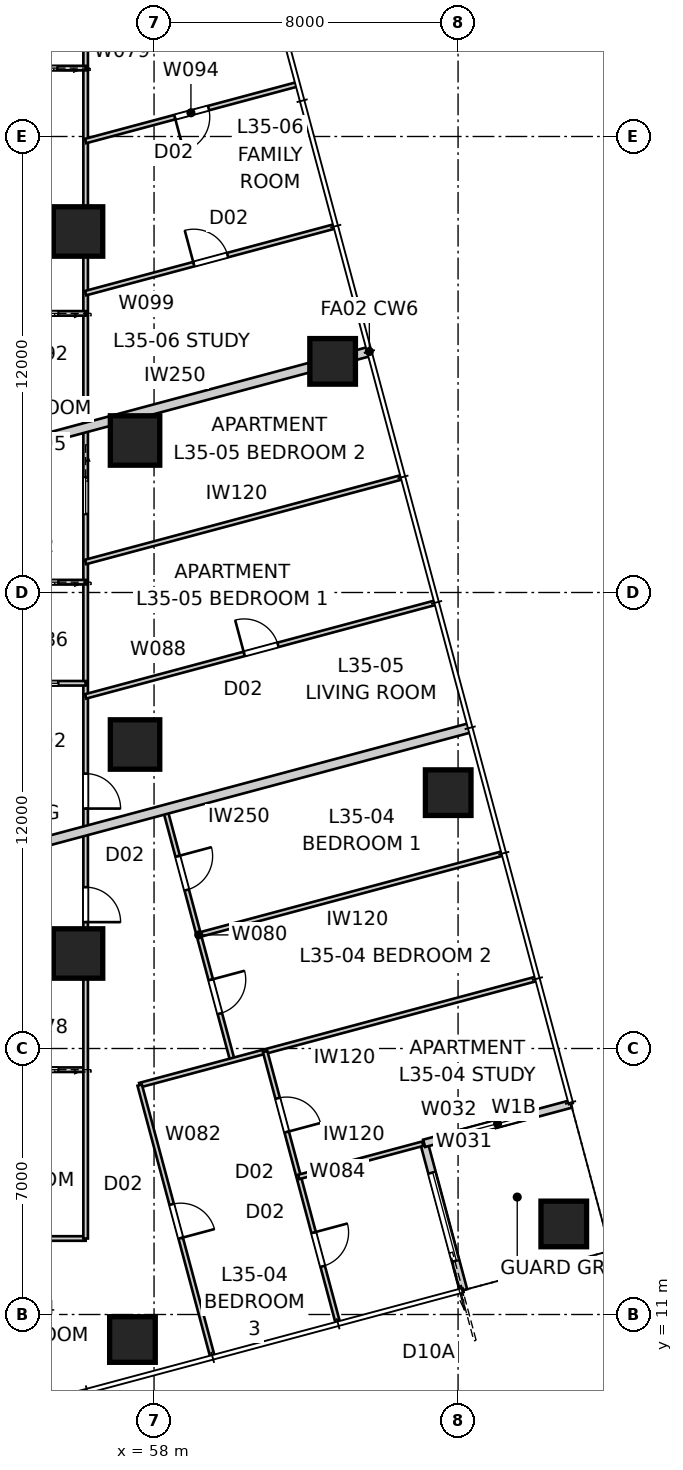
"""IFC4 building model, lengths in metres.
Left out: names, types, materials, properties, quantities, classifications, styles, units other than length and angle.
Written with IfcOpenShell. Run it as: python <this file> out.ifc"""

import sys

from ifc_helpers import new_model, si_unit, direction, frame, frame_2d, origin, origin_2d, place, context, subcontext, project, spatial, rectangle, extrude, element, fill, save


model = new_model("IFC4")
c1 = context("Model", 3, precision=1e-05, world=origin(), true_north=direction((0.0, 1.0)))
c2 = subcontext(c1, "Body", "Model", "MODEL_VIEW")
j1 = project(units=[si_unit("LENGTHUNIT", "METRE"), si_unit("PLANEANGLEUNIT", "RADIAN")], contexts=[c1])
p1 = place(None, origin())
s1 = spatial("IfcSite", under=j1, at=p1, CompositionType="ELEMENT")
p2 = place(p1, origin())
s2 = spatial("IfcBuilding", under=s1, at=p2, CompositionType="ELEMENT")
p3 = place(p2, frame((0.0, 0.0, 128.6)))
s3 = spatial("IfcBuildingStorey", under=s2, at=p3, CompositionType="ELEMENT", Elevation=128.6)
for number, where, z_axis, x_axis in (
    (1, (57.432, 10.342, 0.0), (0.0, 0.0, 1.0), (1.0, 0.0, 0.0)),
    (2, (68.781, 13.383, 0.0), (0.0, 0.0, 1.0), (1.0, 0.0, 0.0)),
    (3, (65.74, 24.733, 0.0), (0.0, 0.0, 1.0), (1.0, 0.0, 0.0)),
    (4, (62.699, 36.082, 0.0), (0.0, 0.0, 1.0), (1.0, 0.0, 0.0)),
):
    element("IfcColumn", number, at=place(p3, frame(where, z_axis=z_axis, x_axis=x_axis)), inside=s3, PredefinedType="COLUMN", context=c2, shape_type="SweptSolid", body=[
        extrude(rectangle(XDim=1.2, YDim=1.2, at=origin_2d()), origin(), (0.0, 0.0, 1.0), 3.4),
    ])
for number, where, z_axis, x_axis in (
    (5, (57.5, 26.0, 0.0), (0.0, 0.0, 1.0), (1.0, 0.0, 0.0)),
    (6, (57.5, 34.0, 0.0), (0.0, 0.0, 1.0), (1.0, 0.0, 0.0)),
    (7, (56.0, 39.5, 0.0), (0.0, 0.0, 1.0), (1.0, 0.0, 0.0)),
    (8, (56.0, 20.5, 0.0), (0.0, 0.0, 1.0), (1.0, 0.0, 0.0)),
):
    element("IfcColumn", number, at=place(p3, frame(where, z_axis=z_axis, x_axis=x_axis)), inside=s3, PredefinedType="COLUMN", context=c2, shape_type="SweptSolid", body=[
        extrude(rectangle(XDim=1.3, YDim=1.3, at=origin_2d()), origin(), (0.0, 0.0, 1.0), 3.4),
    ])
p4 = place(p3, frame((66.143, 11.641, 0.0), z_axis=(0.0, 0.0, 1.0), x_axis=(-0.258843877716, 0.965919172068, 0.0)))
e9 = element("IfcWall", 9, at=p4, inside=s3, PredefinedType="SOLIDWALL", context=c2, shape_type="SweptSolid", body=[
    extrude(rectangle(XDim=4.0, YDim=0.2, at=frame_2d((2.0, 0.0))), origin(), (0.0, 0.0, 1.0), 3.25),
])
p5 = place(p4, frame((0.8, 0.0, 0.0)))
e10 = element("IfcOpeningElement", 10, at=p5, cuts=e9, PredefinedType="OPENING", context=c2, shape_type="SweptSolid", body=[
    extrude(rectangle(XDim=2.4, YDim=2.1, at=frame_2d((1.2, 1.05))), frame((0.0, 0.11, 0.0), z_axis=(0.0, -1.0, 0.0), x_axis=(1.0, 0.0, 0.0)), (0.0, 0.0, 1.0), 0.22),
])
p6 = place(p3, frame((65.107, 15.504, 0.0), z_axis=(0.0, 0.0, 1.0), x_axis=(0.965934430412, 0.258786931944, 0.0)))
e11 = element("IfcWall", 11, at=p6, inside=s3, PredefinedType="SOLIDWALL", context=c2, shape_type="SweptSolid", body=[
    extrude(rectangle(XDim=4.0, YDim=0.2, at=frame_2d((2.0, 0.0))), origin(), (0.0, 0.0, 1.0), 3.25),
])
p7 = place(p6, frame((1.0, 0.0, 0.45)))
e12 = element("IfcOpeningElement", 12, at=p7, cuts=e11, PredefinedType="OPENING", context=c2, shape_type="SweptSolid", body=[
    extrude(rectangle(XDim=2.0, YDim=1.8, at=frame_2d((1.0, 0.9))), frame((0.0, 0.11, 0.0), z_axis=(0.0, -1.0, 0.0), x_axis=(1.0, 0.0, 0.0)), (0.0, 0.0, 1.0), 0.22),
])
p8 = place(p3, frame((63.665, 36.341, 0.0), z_axis=(0.0, 0.0, 1.0), x_axis=(-0.965927365002, -0.258813302479, 0.0)))
e13 = element("IfcWall", 13, at=p8, inside=s3, PredefinedType="PARTITIONING", context=c2, shape_type="SweptSolid", body=[
    extrude(rectangle(XDim=10.22, YDim=0.25, at=frame_2d((5.11, 0.0))), origin(), (0.0, 0.0, 1.0), 3.25),
])
p9 = place(p3, frame((66.318, 26.44, 0.0), z_axis=(0.0, 0.0, 1.0), x_axis=(-0.965924854576, -0.258822671559, 0.0)))
e14 = element("IfcWall", 14, at=p9, inside=s3, PredefinedType="PARTITIONING", context=c2, shape_type="SweptSolid", body=[
    extrude(rectangle(XDim=12.966, YDim=0.25, at=frame_2d((6.483, 0.0))), origin(), (0.0, 0.0, 1.0), 3.25),
])
p10 = place(p3, frame((56.2, 13.0, 0.0), z_axis=(0.0, 0.0, 1.0), x_axis=(-1.0, 0.0, 0.0)))
e15 = element("IfcWall", 15, at=p10, inside=s3, PredefinedType="PARTITIONING", context=c2, shape_type="SweptSolid", body=[
    extrude(rectangle(XDim=5.4, YDim=0.12, at=frame_2d((2.7, 0.0))), origin(), (0.0, 0.0, 1.0), 3.25),
])
p11 = place(p3, frame((56.2, 17.442, 0.0), z_axis=(0.0, 0.0, 1.0), x_axis=(-1.0, 0.0, 0.0)))
e16 = element("IfcWall", 16, at=p11, inside=s3, PredefinedType="PARTITIONING", context=c2, shape_type="SweptSolid", body=[
    extrude(rectangle(XDim=2.4, YDim=0.12, at=frame_2d((1.2, 0.0))), origin(), (0.0, 0.0, 1.0), 3.25),
])
p12 = place(p11, frame((0.72, 0.0, 0.0)))
e17 = element("IfcOpeningElement", 17, at=p12, cuts=e16, PredefinedType="OPENING", context=c2, shape_type="SweptSolid", body=[
    extrude(rectangle(XDim=0.96, YDim=2.1, at=frame_2d((0.48, 1.05))), frame((0.0, 0.07, 0.0), z_axis=(0.0, -1.0, 0.0), x_axis=(1.0, 0.0, 0.0)), (0.0, 0.0, 1.0), 0.14),
])
p13 = place(p3, frame((56.2, 46.2, 0.0), z_axis=(0.0, 0.0, 1.0), x_axis=(0.0, -1.0, 0.0)))
e18 = element("IfcWall", 18, at=p13, inside=s3, PredefinedType="PARTITIONING", context=c2, shape_type="SweptSolid", body=[
    extrude(rectangle(XDim=33.2, YDim=0.12, at=frame_2d((16.6, 0.0))), origin(), (0.0, 0.0, 1.0), 2.55),
])
p14 = place(p13, frame((23.955, 0.0, 0.0)))
e19 = element("IfcOpeningElement", 19, at=p14, cuts=e18, PredefinedType="OPENING", context=c2, shape_type="SweptSolid", body=[
    extrude(rectangle(XDim=0.92, YDim=2.34, at=frame_2d((0.46, 1.17))), frame((0.0, 0.07, 0.0), z_axis=(0.0, -1.0, 0.0), x_axis=(1.0, 0.0, 0.0)), (0.0, 0.0, 1.0), 0.14),
])
p15 = place(p13, frame((20.966, 0.0, 0.0)))
e20 = element("IfcOpeningElement", 20, at=p15, cuts=e18, PredefinedType="OPENING", context=c2, shape_type="SweptSolid", body=[
    extrude(rectangle(XDim=0.92, YDim=2.34, at=frame_2d((0.46, 1.17))), frame((0.0, 0.07, 0.0), z_axis=(0.0, -1.0, 0.0), x_axis=(1.0, 0.0, 0.0)), (0.0, 0.0, 1.0), 0.14),
])
p16 = place(p13, frame((13.174, 0.0, 0.0)))
e21 = element("IfcOpeningElement", 21, at=p16, cuts=e18, PredefinedType="OPENING", context=c2, shape_type="SweptSolid", body=[
    extrude(rectangle(XDim=0.96, YDim=2.1, at=frame_2d((0.48, 1.05))), frame((0.0, 0.07, 0.0), z_axis=(0.0, -1.0, 0.0), x_axis=(1.0, 0.0, 0.0)), (0.0, 0.0, 1.0), 0.14),
])
p17 = place(p3, frame((58.292, 24.29, 0.0), z_axis=(0.0, 0.0, 1.0), x_axis=(0.258809899302, -0.965928276853, 0.0)))
e22 = element("IfcWall", 22, at=p17, inside=s3, PredefinedType="PARTITIONING", context=c2, shape_type="SweptSolid", body=[
    extrude(rectangle(XDim=6.833, YDim=0.12, at=frame_2d((3.417, 0.0))), origin(), (0.0, 0.0, 1.0), 3.25),
])
p18 = place(p17, frame((1.273, 0.0, 0.0)))
e23 = element("IfcOpeningElement", 23, at=p18, cuts=e22, PredefinedType="OPENING", context=c2, shape_type="SweptSolid", body=[
    extrude(rectangle(XDim=0.92, YDim=2.34, at=frame_2d((0.46, 1.17))), frame((0.0, 0.07, 0.0), z_axis=(0.0, -1.0, 0.0), x_axis=(1.0, 0.0, 0.0)), (0.0, 0.0, 1.0), 0.14),
])
p19 = place(p17, frame((4.64, 0.0, 0.0)))
e24 = element("IfcOpeningElement", 24, at=p19, cuts=e22, PredefinedType="OPENING", context=c2, shape_type="SweptSolid", body=[
    extrude(rectangle(XDim=0.92, YDim=2.34, at=frame_2d((0.46, 1.17))), frame((0.0, 0.07, 0.0), z_axis=(0.0, -1.0, 0.0), x_axis=(1.0, 0.0, 0.0)), (0.0, 0.0, 1.0), 0.14),
])
p20 = place(p3, frame((68.048, 19.83, 0.0), z_axis=(0.0, 0.0, 1.0), x_axis=(-0.965921496576, -0.258835203272, 0.0)))
e25 = element("IfcWall", 25, at=p20, inside=s3, PredefinedType="PARTITIONING", context=c2, shape_type="SweptSolid", body=[
    extrude(rectangle(XDim=10.793, YDim=0.12, at=frame_2d((5.397, 0.0))), origin(), (0.0, 0.0, 1.0), 3.25),
])
p21 = place(p3, frame((57.623, 17.036, 0.0), z_axis=(0.0, 0.0, 1.0), x_axis=(0.258816044185, -0.965926630377, 0.0)))
e26 = element("IfcWall", 26, at=p21, inside=s3, PredefinedType="PARTITIONING", context=c2, shape_type="SweptSolid", body=[
    extrude(rectangle(XDim=7.377, YDim=0.12, at=frame_2d((3.688, 0.0))), origin(), (0.0, 0.0, 1.0), 2.638),
])
p22 = place(p21, frame((3.248, 0.0, 0.0)))
e27 = element("IfcOpeningElement", 27, at=p22, cuts=e26, PredefinedType="OPENING", context=c2, shape_type="SweptSolid", body=[
    extrude(rectangle(XDim=0.92, YDim=2.34, at=frame_2d((0.46, 1.17))), frame((0.0, 0.07, 0.0), z_axis=(0.0, -1.0, 0.0), x_axis=(1.0, 0.0, 0.0)), (0.0, 0.0, 1.0), 0.14),
])
p23 = place(p3, frame((67.164, 23.13, 0.0), z_axis=(0.0, 0.0, 1.0), x_axis=(-0.965929470378, -0.258805444794, 0.0)))
e28 = element("IfcWall", 28, at=p23, inside=s3, PredefinedType="PARTITIONING", context=c2, shape_type="SweptSolid", body=[
    extrude(rectangle(XDim=8.269, YDim=0.12, at=frame_2d((4.135, 0.0))), origin(), (0.0, 0.0, 1.0), 2.722),
])
p24 = place(p3, frame((60.923, 17.92, 0.0), z_axis=(0.0, 0.0, 1.0), x_axis=(0.258846923464, -0.965918355874, 0.0)))
e29 = element("IfcWall", 29, at=p24, inside=s3, PredefinedType="PARTITIONING", context=c2, shape_type="SweptSolid", body=[
    extrude(rectangle(XDim=7.377, YDim=0.12, at=frame_2d((3.688, 0.0))), origin(), (0.0, 0.0, 1.0), 3.25),
])
p25 = place(p24, frame((4.932, 0.0, 0.0)))
e30 = element("IfcOpeningElement", 30, at=p25, cuts=e29, PredefinedType="OPENING", context=c2, shape_type="SweptSolid", body=[
    extrude(rectangle(XDim=0.92, YDim=2.34, at=frame_2d((0.46, 1.17))), frame((0.0, 0.07, 0.0), z_axis=(0.0, -1.0, 0.0), x_axis=(1.0, 0.0, 0.0)), (0.0, 0.0, 1.0), 0.14),
])
p26 = place(p24, frame((1.273, 0.0, 0.0)))
e31 = element("IfcOpeningElement", 31, at=p26, cuts=e29, PredefinedType="OPENING", context=c2, shape_type="SweptSolid", body=[
    extrude(rectangle(XDim=0.92, YDim=2.34, at=frame_2d((0.46, 1.17))), frame((0.0, 0.07, 0.0), z_axis=(0.0, -1.0, 0.0), x_axis=(1.0, 0.0, 0.0)), (0.0, 0.0, 1.0), 0.14),
])
p27 = place(p3, frame((65.069, 15.494, 0.0), z_axis=(0.0, 0.0, 1.0), x_axis=(-0.96593546512, -0.258783069815, 0.0)))
e32 = element("IfcWall", 32, at=p27, inside=s3, PredefinedType="PARTITIONING", context=c2, shape_type="SweptSolid", body=[
    extrude(rectangle(XDim=3.376, YDim=0.12, at=frame_2d((1.688, 0.0))), origin(), (0.0, 0.0, 1.0), 3.25),
])
p28 = place(p3, frame((53.8, 27.611, 0.0), z_axis=(0.0, 0.0, 1.0), x_axis=(1.0, 0.0, 0.0)))
e33 = element("IfcWall", 33, at=p28, inside=s3, PredefinedType="PARTITIONING", context=c2, shape_type="SweptSolid", body=[
    extrude(rectangle(XDim=2.4, YDim=0.12, at=frame_2d((1.2, 0.0))), origin(), (0.0, 0.0, 1.0), 3.25),
])
p29 = place(p28, frame((0.72, 0.0, 0.0)))
e34 = element("IfcOpeningElement", 34, at=p29, cuts=e33, PredefinedType="OPENING", context=c2, shape_type="SweptSolid", body=[
    extrude(rectangle(XDim=0.96, YDim=2.1, at=frame_2d((0.48, 1.05))), frame((0.0, 0.07, 0.0), z_axis=(0.0, -1.0, 0.0), x_axis=(1.0, 0.0, 0.0)), (0.0, 0.0, 1.0), 0.14),
])
p30 = place(p3, frame((56.2, 30.272, 0.0), z_axis=(0.0, 0.0, 1.0), x_axis=(-1.0, 0.0, 0.0)))
e35 = element("IfcWall", 35, at=p30, inside=s3, PredefinedType="PARTITIONING", context=c2, shape_type="SweptSolid", body=[
    extrude(rectangle(XDim=2.4, YDim=0.12, at=frame_2d((1.2, 0.0))), origin(), (0.0, 0.0, 1.0), 3.25),
])
p31 = place(p30, frame((0.72, 0.0, 0.0)))
e36 = element("IfcOpeningElement", 36, at=p31, cuts=e35, PredefinedType="OPENING", context=c2, shape_type="SweptSolid", body=[
    extrude(rectangle(XDim=0.96, YDim=2.1, at=frame_2d((0.48, 1.05))), frame((0.0, 0.07, 0.0), z_axis=(0.0, -1.0, 0.0), x_axis=(1.0, 0.0, 0.0)), (0.0, 0.0, 1.0), 0.14),
])
p32 = place(p3, frame((56.2, 27.266, 0.0), z_axis=(0.0, 0.0, 1.0), x_axis=(0.965926072385, 0.25881812666, 0.0)))
e37 = element("IfcWall", 37, at=p32, inside=s3, PredefinedType="PARTITIONING", context=c2, shape_type="SweptSolid", body=[
    extrude(rectangle(XDim=9.52, YDim=0.12, at=frame_2d((4.76, 0.0))), origin(), (0.0, 0.0, 1.0), 3.25),
])
p33 = place(p32, frame((4.32, 0.0, 0.0)))
e38 = element("IfcOpeningElement", 38, at=p33, cuts=e37, PredefinedType="OPENING", context=c2, shape_type="SweptSolid", body=[
    extrude(rectangle(XDim=0.92, YDim=2.34, at=frame_2d((0.46, 1.17))), frame((0.0, 0.07, 0.0), z_axis=(0.0, -1.0, 0.0), x_axis=(1.0, 0.0, 0.0)), (0.0, 0.0, 1.0), 0.14),
])
p34 = place(p3, frame((56.2, 30.803, 0.0), z_axis=(0.0, 0.0, 1.0), x_axis=(0.965920565748, 0.258838676912, 0.0)))
e39 = element("IfcWall", 39, at=p34, inside=s3, PredefinedType="PARTITIONING", context=c2, shape_type="SweptSolid", body=[
    extrude(rectangle(XDim=8.604, YDim=0.12, at=frame_2d((4.302, 0.0))), origin(), (0.0, 0.0, 1.0), 3.25),
])
p35 = place(p3, frame((56.2, 43.8, 0.0), z_axis=(0.0, 0.0, 1.0), x_axis=(-1.0, 0.0, 0.0)))
e40 = element("IfcWall", 40, at=p35, inside=s3, PredefinedType="PARTITIONING", context=c2, shape_type="SweptSolid", body=[
    extrude(rectangle(XDim=2.45, YDim=0.12, at=frame_2d((1.225, 0.0))), origin(), (0.0, 0.0, 1.0), 2.722),
])
p36 = place(p35, frame((0.745, 0.0, 0.0)))
e41 = element("IfcOpeningElement", 41, at=p36, cuts=e40, PredefinedType="OPENING", context=c2, shape_type="SweptSolid", body=[
    extrude(rectangle(XDim=0.96, YDim=2.1, at=frame_2d((0.48, 1.05))), frame((0.0, 0.07, 0.0), z_axis=(0.0, -1.0, 0.0), x_axis=(1.0, 0.0, 0.0)), (0.0, 0.0, 1.0), 0.14),
])
p37 = place(p3, frame((56.2, 37.345, 0.0), z_axis=(0.0, 0.0, 1.0), x_axis=(-1.0, 0.0, 0.0)))
e42 = element("IfcWall", 42, at=p37, inside=s3, PredefinedType="PARTITIONING", context=c2, shape_type="SweptSolid", body=[
    extrude(rectangle(XDim=2.4, YDim=0.12, at=frame_2d((1.2, 0.0))), origin(), (0.0, 0.0, 1.0), 3.25),
])
p38 = place(p37, frame((0.72, 0.0, 0.0)))
e43 = element("IfcOpeningElement", 43, at=p38, cuts=e42, PredefinedType="OPENING", context=c2, shape_type="SweptSolid", body=[
    extrude(rectangle(XDim=0.96, YDim=2.1, at=frame_2d((0.48, 1.05))), frame((0.0, 0.07, 0.0), z_axis=(0.0, -1.0, 0.0), x_axis=(1.0, 0.0, 0.0)), (0.0, 0.0, 1.0), 0.14),
])
p39 = place(p3, frame((61.741, 43.366, 0.0), z_axis=(0.0, 0.0, 1.0), x_axis=(-0.965924876974, -0.25882258797, 0.0)))
e44 = element("IfcWall", 44, at=p39, inside=s3, PredefinedType="PARTITIONING", context=c2, shape_type="SweptSolid", body=[
    extrude(rectangle(XDim=5.737, YDim=0.12, at=frame_2d((2.869, 0.0))), origin(), (0.0, 0.0, 1.0), 3.25),
])
p40 = place(p39, frame((2.388, 0.0, 0.0)))
e45 = element("IfcOpeningElement", 45, at=p40, cuts=e44, PredefinedType="OPENING", context=c2, shape_type="SweptSolid", body=[
    extrude(rectangle(XDim=0.92, YDim=2.34, at=frame_2d((0.46, 1.17))), frame((0.0, 0.07, 0.0), z_axis=(0.0, -1.0, 0.0), x_axis=(1.0, 0.0, 0.0)), (0.0, 0.0, 1.0), 0.14),
])
p41 = place(p3, frame((56.2, 37.878, 0.0), z_axis=(0.0, 0.0, 1.0), x_axis=(0.96591892777, 0.258844789354, 0.0)))
e46 = element("IfcWall", 46, at=p41, inside=s3, PredefinedType="PARTITIONING", context=c2, shape_type="SweptSolid", body=[
    extrude(rectangle(XDim=6.773, YDim=0.12, at=frame_2d((3.386, 0.0))), origin(), (0.0, 0.0, 1.0), 3.25),
])
p42 = place(p41, frame((2.947, 0.0, 0.0)))
e47 = element("IfcOpeningElement", 47, at=p42, cuts=e46, PredefinedType="OPENING", context=c2, shape_type="SweptSolid", body=[
    extrude(rectangle(XDim=0.92, YDim=2.34, at=frame_2d((0.46, 1.17))), frame((0.0, 0.07, 0.0), z_axis=(0.0, -1.0, 0.0), x_axis=(1.0, 0.0, 0.0)), (0.0, 0.0, 1.0), 0.14),
])
p43 = place(p5, origin())
e48 = element("IfcDoor", 48, at=p43, inside=s3, OperationType="SLIDING_TO_LEFT", PredefinedType="DOOR", context=c2, shape_type="SweptSolid", body=[
    extrude(rectangle(XDim=2.4, YDim=2.1, at=frame_2d((1.2, 1.05))), frame((0.0, 0.025, 0.0), z_axis=(0.0, -1.0, 0.0), x_axis=(1.0, 0.0, 0.0)), (0.0, 0.0, 1.0), 0.05),
])
fill(e10, e48)
p44 = place(p7, origin())
e49 = element("IfcWindow", 49, at=p44, inside=s3, PartitioningType="SINGLE_PANEL", PredefinedType="WINDOW", context=c2, shape_type="SweptSolid", body=[
    extrude(rectangle(XDim=2.0, YDim=1.8, at=frame_2d((1.0, 0.9))), frame((0.0, 0.03, 0.0), z_axis=(0.0, -1.0, 0.0), x_axis=(1.0, 0.0, 0.0)), (0.0, 0.0, 1.0), 0.06),
])
fill(e12, e49)
p45 = place(p36, origin())
e50 = element("IfcDoor", 50, at=p45, inside=s3, OperationType="SLIDING_TO_LEFT", PredefinedType="DOOR", context=c2, shape_type="SweptSolid", body=[
    extrude(rectangle(XDim=0.96, YDim=2.1, at=frame_2d((0.48, 1.05))), frame((0.0, 0.025, 0.0), z_axis=(0.0, -1.0, 0.0), x_axis=(1.0, 0.0, 0.0)), (0.0, 0.0, 1.0), 0.05),
])
fill(e41, e50)
p46 = place(p14, origin())
e51 = element("IfcDoor", 51, at=p46, inside=s3, OperationType="SINGLE_SWING_RIGHT", PredefinedType="DOOR", context=c2, shape_type="SweptSolid", body=[
    extrude(rectangle(XDim=0.92, YDim=2.34, at=frame_2d((0.46, 1.17))), frame((0.0, 0.025, 0.0), z_axis=(0.0, -1.0, 0.0), x_axis=(1.0, 0.0, 0.0)), (0.0, 0.0, 1.0), 0.05),
])
fill(e19, e51)
p47 = place(p12, origin())
e52 = element("IfcDoor", 52, at=p47, inside=s3, OperationType="SLIDING_TO_LEFT", PredefinedType="DOOR", context=c2, shape_type="SweptSolid", body=[
    extrude(rectangle(XDim=0.96, YDim=2.1, at=frame_2d((0.48, 1.05))), frame((0.0, 0.025, 0.0), z_axis=(0.0, -1.0, 0.0), x_axis=(1.0, 0.0, 0.0)), (0.0, 0.0, 1.0), 0.05),
])
fill(e17, e52)
p48 = place(p15, origin())
e53 = element("IfcDoor", 53, at=p48, inside=s3, OperationType="SINGLE_SWING_RIGHT", PredefinedType="DOOR", context=c2, shape_type="SweptSolid", body=[
    extrude(rectangle(XDim=0.92, YDim=2.34, at=frame_2d((0.46, 1.17))), frame((0.0, 0.025, 0.0), z_axis=(0.0, -1.0, 0.0), x_axis=(1.0, 0.0, 0.0)), (0.0, 0.0, 1.0), 0.05),
])
fill(e20, e53)
p49 = place(p29, origin())
e54 = element("IfcDoor", 54, at=p49, inside=s3, OperationType="SLIDING_TO_LEFT", PredefinedType="DOOR", context=c2, shape_type="SweptSolid", body=[
    extrude(rectangle(XDim=0.96, YDim=2.1, at=frame_2d((0.48, 1.05))), frame((0.0, 0.025, 0.0), z_axis=(0.0, -1.0, 0.0), x_axis=(1.0, 0.0, 0.0)), (0.0, 0.0, 1.0), 0.05),
])
fill(e34, e54)
p50 = place(p40, origin())
e55 = element("IfcDoor", 55, at=p50, inside=s3, OperationType="SINGLE_SWING_RIGHT", PredefinedType="DOOR", context=c2, shape_type="SweptSolid", body=[
    extrude(rectangle(XDim=0.92, YDim=2.34, at=frame_2d((0.46, 1.17))), frame((0.0, 0.025, 0.0), z_axis=(0.0, -1.0, 0.0), x_axis=(1.0, 0.0, 0.0)), (0.0, 0.0, 1.0), 0.05),
])
fill(e45, e55)
p51 = place(p38, origin())
e56 = element("IfcDoor", 56, at=p51, inside=s3, OperationType="SLIDING_TO_LEFT", PredefinedType="DOOR", context=c2, shape_type="SweptSolid", body=[
    extrude(rectangle(XDim=0.96, YDim=2.1, at=frame_2d((0.48, 1.05))), frame((0.0, 0.025, 0.0), z_axis=(0.0, -1.0, 0.0), x_axis=(1.0, 0.0, 0.0)), (0.0, 0.0, 1.0), 0.05),
])
fill(e43, e56)
p52 = place(p22, origin())
e57 = element("IfcDoor", 57, at=p52, inside=s3, OperationType="SINGLE_SWING_RIGHT", PredefinedType="DOOR", context=c2, shape_type="SweptSolid", body=[
    extrude(rectangle(XDim=0.92, YDim=2.34, at=frame_2d((0.46, 1.17))), frame((0.0, 0.025, 0.0), z_axis=(0.0, -1.0, 0.0), x_axis=(1.0, 0.0, 0.0)), (0.0, 0.0, 1.0), 0.05),
])
fill(e27, e57)
p53 = place(p18, origin())
e58 = element("IfcDoor", 58, at=p53, inside=s3, OperationType="SINGLE_SWING_LEFT", PredefinedType="DOOR", context=c2, shape_type="SweptSolid", body=[
    extrude(rectangle(XDim=0.92, YDim=2.34, at=frame_2d((0.46, 1.17))), frame((0.0, 0.025, 0.0), z_axis=(0.0, -1.0, 0.0), x_axis=(1.0, 0.0, 0.0)), (0.0, 0.0, 1.0), 0.05),
])
fill(e23, e58)
p54 = place(p19, origin())
e59 = element("IfcDoor", 59, at=p54, inside=s3, OperationType="SINGLE_SWING_LEFT", PredefinedType="DOOR", context=c2, shape_type="SweptSolid", body=[
    extrude(rectangle(XDim=0.92, YDim=2.34, at=frame_2d((0.46, 1.17))), frame((0.0, 0.025, 0.0), z_axis=(0.0, -1.0, 0.0), x_axis=(1.0, 0.0, 0.0)), (0.0, 0.0, 1.0), 0.05),
])
fill(e24, e59)
p55 = place(p33, origin())
e60 = element("IfcDoor", 60, at=p55, inside=s3, OperationType="SINGLE_SWING_LEFT", PredefinedType="DOOR", context=c2, shape_type="SweptSolid", body=[
    extrude(rectangle(XDim=0.92, YDim=2.34, at=frame_2d((0.46, 1.17))), frame((0.0, 0.025, 0.0), z_axis=(0.0, -1.0, 0.0), x_axis=(1.0, 0.0, 0.0)), (0.0, 0.0, 1.0), 0.05),
])
fill(e38, e60)
p56 = place(p31, origin())
e61 = element("IfcDoor", 61, at=p56, inside=s3, OperationType="SLIDING_TO_LEFT", PredefinedType="DOOR", context=c2, shape_type="SweptSolid", body=[
    extrude(rectangle(XDim=0.96, YDim=2.1, at=frame_2d((0.48, 1.05))), frame((0.0, 0.025, 0.0), z_axis=(0.0, -1.0, 0.0), x_axis=(1.0, 0.0, 0.0)), (0.0, 0.0, 1.0), 0.05),
])
fill(e36, e61)
p57 = place(p42, origin())
e62 = element("IfcDoor", 62, at=p57, inside=s3, OperationType="SINGLE_SWING_LEFT", PredefinedType="DOOR", context=c2, shape_type="SweptSolid", body=[
    extrude(rectangle(XDim=0.92, YDim=2.34, at=frame_2d((0.46, 1.17))), frame((0.0, 0.025, 0.0), z_axis=(0.0, -1.0, 0.0), x_axis=(1.0, 0.0, 0.0)), (0.0, 0.0, 1.0), 0.05),
])
fill(e47, e62)
p58 = place(p16, origin())
e63 = element("IfcDoor", 63, at=p58, inside=s3, OperationType="SLIDING_TO_LEFT", PredefinedType="DOOR", context=c2, shape_type="SweptSolid", body=[
    extrude(rectangle(XDim=0.96, YDim=2.1, at=frame_2d((0.48, 1.05))), frame((0.0, 0.025, 0.0), z_axis=(0.0, -1.0, 0.0), x_axis=(1.0, 0.0, 0.0)), (0.0, 0.0, 1.0), 0.05),
])
fill(e21, e63)
p59 = place(p25, origin())
e64 = element("IfcDoor", 64, at=p59, inside=s3, OperationType="SINGLE_SWING_LEFT", PredefinedType="DOOR", context=c2, shape_type="SweptSolid", body=[
    extrude(rectangle(XDim=0.92, YDim=2.34, at=frame_2d((0.46, 1.17))), frame((0.0, 0.025, 0.0), z_axis=(0.0, -1.0, 0.0), x_axis=(1.0, 0.0, 0.0)), (0.0, 0.0, 1.0), 0.05),
])
fill(e30, e64)
p60 = place(p26, origin())
e65 = element("IfcDoor", 65, at=p60, inside=s3, OperationType="SINGLE_SWING_RIGHT", PredefinedType="DOOR", context=c2, shape_type="SweptSolid", body=[
    extrude(rectangle(XDim=0.92, YDim=2.34, at=frame_2d((0.46, 1.17))), frame((0.0, 0.025, 0.0), z_axis=(0.0, -1.0, 0.0), x_axis=(1.0, 0.0, 0.0)), (0.0, 0.0, 1.0), 0.05),
])
fill(e31, e65)
save(model, sys.argv[1])
